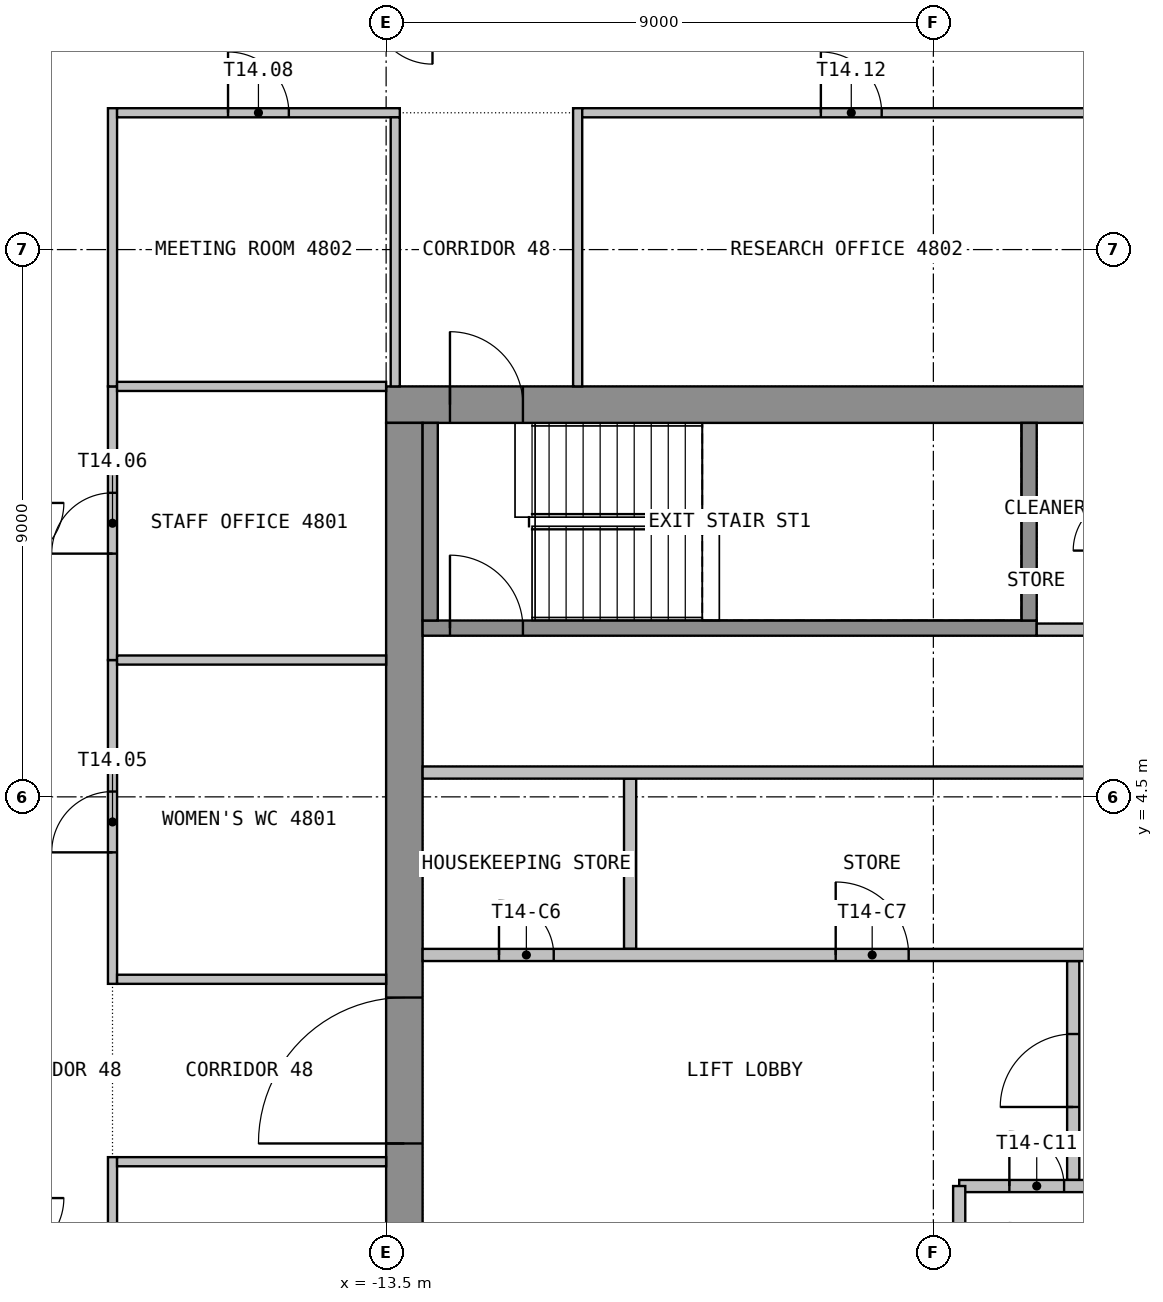
"""IFC4 building model, lengths in metres.
Left out: names, types, materials, properties, quantities, classifications, styles, units other than length and angle.
Written with IfcOpenShell. Run it as: python <this file> out.ifc"""

import sys

from ifc_helpers import new_model, si_unit, direction, frame, frame_2d, origin, place, context, subcontext, project, spatial, rectangle, extrude, element, fill, save


model = new_model("IFC4")
c1 = context("Model", 3, precision=1e-05, world=origin(), true_north=direction((0.0, 1.0)))
c2 = subcontext(c1, "Body", "Model", "MODEL_VIEW")
j1 = project(units=[si_unit("LENGTHUNIT", "METRE"), si_unit("PLANEANGLEUNIT", "RADIAN")], contexts=[c1])
p1 = place(None, origin())
s1 = spatial("IfcSite", under=j1, at=p1, CompositionType="ELEMENT")
p2 = place(p1, origin())
s2 = spatial("IfcBuilding", under=s1, at=p2, CompositionType="ELEMENT")
p3 = place(p2, frame((0.0, 0.0, 195.6)))
s3 = spatial("IfcBuildingStorey", under=s2, at=p3, CompositionType="ELEMENT", Elevation=195.6)
p4 = place(p3, frame((-13.5, 10.95, 0.0), z_axis=(0.0, 0.0, 1.0), x_axis=(1.0, 0.0, 0.0)))
e1 = element("IfcWall", 1, at=p4, inside=s3, PredefinedType="SHEAR", context=c2, shape_type="SweptSolid", body=[
    extrude(rectangle(XDim=27.0, YDim=0.6, at=frame_2d((13.5, 0.0))), origin(), (0.0, 0.0, 1.0), 3.55),
])
p5 = place(p4, frame((12.3, 0.0, 0.0)))
e2 = element("IfcOpeningElement", 2, at=p5, cuts=e1, PredefinedType="OPENING", context=c2, shape_type="SweptSolid", body=[
    extrude(rectangle(XDim=2.4, YDim=2.1, at=frame_2d((1.2, 1.05))), frame((0.0, 0.31, 0.0), z_axis=(0.0, -1.0, 0.0), x_axis=(1.0, 0.0, 0.0)), (0.0, 0.0, 1.0), 0.62),
])
p6 = place(p4, frame((1.05, 0.0, 0.0)))
e3 = element("IfcOpeningElement", 3, at=p6, cuts=e1, PredefinedType="OPENING", context=c2, shape_type="SweptSolid", body=[
    extrude(rectangle(XDim=1.2, YDim=2.1, at=frame_2d((0.6, 1.05))), frame((0.0, 0.31, 0.0), z_axis=(0.0, -1.0, 0.0), x_axis=(1.0, 0.0, 0.0)), (0.0, 0.0, 1.0), 0.62),
])
p7 = place(p4, frame((24.75, 0.0, 0.0)))
e4 = element("IfcOpeningElement", 4, at=p7, cuts=e1, PredefinedType="OPENING", context=c2, shape_type="SweptSolid", body=[
    extrude(rectangle(XDim=1.2, YDim=2.1, at=frame_2d((0.6, 1.05))), frame((0.0, 0.31, 0.0), z_axis=(0.0, -1.0, 0.0), x_axis=(1.0, 0.0, 0.0)), (0.0, 0.0, 1.0), 0.62),
])
p8 = place(p3, frame((-13.2, -10.65, 0.0), z_axis=(0.0, 0.0, 1.0), x_axis=(0.0, 1.0, 0.0)))
e5 = element("IfcWall", 5, at=p8, inside=s3, PredefinedType="SHEAR", context=c2, shape_type="SweptSolid", body=[
    extrude(rectangle(XDim=21.3, YDim=0.6, at=frame_2d((10.65, 0.0))), origin(), (0.0, 0.0, 1.0), 3.55),
])
p9 = place(p8, frame((9.45, 0.0, 0.0)))
e6 = element("IfcOpeningElement", 6, at=p9, cuts=e5, PredefinedType="OPENING", context=c2, shape_type="SweptSolid", body=[
    extrude(rectangle(XDim=2.4, YDim=2.1, at=frame_2d((1.2, 1.05))), frame((0.0, 0.31, 0.0), z_axis=(0.0, -1.0, 0.0), x_axis=(1.0, 0.0, 0.0)), (0.0, 0.0, 1.0), 0.62),
])
p10 = place(p3, frame((-2.2, -1.8, 0.0), z_axis=(0.0, 0.0, 1.0), x_axis=(0.0, 1.0, 0.0)))
e7 = element("IfcWall", 7, at=p10, inside=s3, PredefinedType="PARTITIONING", context=c2, shape_type="SweptSolid", body=[
    extrude(rectangle(XDim=3.6, YDim=0.2, at=frame_2d((1.8, 0.0))), origin(), (0.0, 0.0, 1.0), 3.55),
])
p11 = place(p10, frame((1.2, 0.0, 0.0)))
e8 = element("IfcOpeningElement", 8, at=p11, cuts=e7, PredefinedType="OPENING", context=c2, shape_type="SweptSolid", body=[
    extrude(rectangle(XDim=1.2, YDim=2.1, at=frame_2d((0.6, 1.05))), frame((0.0, 0.11, 0.0), z_axis=(0.0, -1.0, 0.0), x_axis=(1.0, 0.0, 0.0)), (0.0, 0.0, 1.0), 0.22),
])
p12 = place(p3, frame((-12.9, 7.275, 0.0), z_axis=(0.0, 0.0, 1.0), x_axis=(1.0, 0.0, 0.0)))
e9 = element("IfcWall", 9, at=p12, inside=s3, PredefinedType="SHEAR", context=c2, shape_type="SweptSolid", body=[
    extrude(rectangle(XDim=10.1, YDim=0.25, at=frame_2d((5.05, 0.0))), origin(), (0.0, 0.0, 1.0), 3.55),
])
p13 = place(p12, frame((0.45, 0.0, 0.0)))
e10 = element("IfcOpeningElement", 10, at=p13, cuts=e9, PredefinedType="OPENING", context=c2, shape_type="SweptSolid", body=[
    extrude(rectangle(XDim=1.2, YDim=2.1, at=frame_2d((0.6, 1.05))), frame((0.0, 0.135, 0.0), z_axis=(0.0, -1.0, 0.0), x_axis=(1.0, 0.0, 0.0)), (0.0, 0.0, 1.0), 0.27),
])
for number, where, z_axis, x_axis in (
    (11, (-12.775, 7.4, 0.0), (0.0, 0.0, 1.0), (0.0, 1.0, 0.0)),
    (12, (-2.925, 7.4, 0.0), (0.0, 0.0, 1.0), (0.0, 1.0, 0.0)),
):
    element("IfcWall", number, at=place(p3, frame(where, z_axis=z_axis, x_axis=x_axis)), inside=s3, PredefinedType="SHEAR", context=c2, shape_type="SweptSolid", body=[
        extrude(rectangle(XDim=3.25, YDim=0.25, at=frame_2d((1.625, 0.0))), origin(), (0.0, 0.0, 1.0), 3.55),
    ])
p14 = place(p3, frame((-2.8, 7.25, 0.0), z_axis=(0.0, 0.0, 1.0), x_axis=(1.0, 0.0, 0.0)))
e13 = element("IfcWall", 13, at=p14, inside=s3, PredefinedType="PARTITIONING", context=c2, shape_type="SweptSolid", body=[
    extrude(rectangle(XDim=1.4, YDim=0.2, at=frame_2d((0.7, 0.0))), origin(), (0.0, 0.0, 1.0), 3.55),
])
p15 = place(p3, frame((-9.488, 2.0, 0.0), z_axis=(0.0, 0.0, 1.0), x_axis=(0.0, 1.0, 0.0)))
e14 = element("IfcWall", 14, at=p15, inside=s3, PredefinedType="PARTITIONING", context=c2, shape_type="SweptSolid", body=[
    extrude(rectangle(XDim=2.8, YDim=0.2, at=frame_2d((1.4, 0.0))), origin(), (0.0, 0.0, 1.0), 3.55),
])
p16 = place(p3, frame((-12.9, 1.9, 0.0), z_axis=(0.0, 0.0, 1.0), x_axis=(1.0, 0.0, 0.0)))
e15 = element("IfcWall", 15, at=p16, inside=s3, PredefinedType="PARTITIONING", context=c2, shape_type="SweptSolid", body=[
    extrude(rectangle(XDim=11.375, YDim=0.2, at=frame_2d((5.688, 0.0))), origin(), (0.0, 0.0, 1.0), 3.55),
])
p17 = place(p16, frame((1.256, 0.0, 0.0)))
e16 = element("IfcOpeningElement", 16, at=p17, cuts=e15, PredefinedType="OPENING", context=c2, shape_type="SweptSolid", body=[
    extrude(rectangle(XDim=0.9, YDim=2.1, at=frame_2d((0.45, 1.05))), frame((0.0, 0.11, 0.0), z_axis=(0.0, -1.0, 0.0), x_axis=(1.0, 0.0, 0.0)), (0.0, 0.0, 1.0), 0.22),
])
p18 = place(p16, frame((6.794, 0.0, 0.0)))
e17 = element("IfcOpeningElement", 17, at=p18, cuts=e15, PredefinedType="OPENING", context=c2, shape_type="SweptSolid", body=[
    extrude(rectangle(XDim=1.2, YDim=2.1, at=frame_2d((0.6, 1.05))), frame((0.0, 0.11, 0.0), z_axis=(0.0, -1.0, 0.0), x_axis=(1.0, 0.0, 0.0)), (0.0, 0.0, 1.0), 0.22),
])
p19 = place(p3, frame((-12.9, 4.9, 0.0), z_axis=(0.0, 0.0, 1.0), x_axis=(1.0, 0.0, 0.0)))
e18 = element("IfcWall", 18, at=p19, inside=s3, PredefinedType="PARTITIONING", context=c2, shape_type="SweptSolid", body=[
    extrude(rectangle(XDim=11.375, YDim=0.2, at=frame_2d((5.688, 0.0))), origin(), (0.0, 0.0, 1.0), 3.55),
])
p20 = place(p3, frame((-4.075, -1.9, 0.0), z_axis=(0.0, 0.0, 1.0), x_axis=(1.0, 0.0, 0.0)))
e19 = element("IfcWall", 19, at=p20, inside=s3, PredefinedType="PARTITIONING", context=c2, shape_type="SweptSolid", body=[
    extrude(rectangle(XDim=2.55, YDim=0.2, at=frame_2d((1.275, 0.0))), origin(), (0.0, 0.0, 1.0), 3.55),
])
p21 = place(p20, frame((0.825, 0.0, 0.0)))
e20 = element("IfcOpeningElement", 20, at=p21, cuts=e19, PredefinedType="OPENING", context=c2, shape_type="SweptSolid", body=[
    extrude(rectangle(XDim=0.9, YDim=2.1, at=frame_2d((0.45, 1.05))), frame((0.0, 0.11, 0.0), z_axis=(0.0, -1.0, 0.0), x_axis=(1.0, 0.0, 0.0)), (0.0, 0.0, 1.0), 0.22),
])
p22 = place(p3, frame((-4.075, -1.9, 0.0), z_axis=(0.0, 0.0, 1.0), x_axis=(0.0, -1.0, 0.0)))
e21 = element("IfcWall", 21, at=p22, inside=s3, PredefinedType="PARTITIONING", context=c2, shape_type="SweptSolid", body=[
    extrude(rectangle(XDim=1.15, YDim=0.2, at=frame_2d((0.575, 0.0))), origin(), (0.0, 0.0, 1.0), 3.55),
])
p23 = place(p3, frame((-18.0, -11.25, 0.0), z_axis=(0.0, 0.0, 1.0), x_axis=(0.0, 1.0, 0.0)))
e22 = element("IfcWall", 22, at=p23, inside=s3, PredefinedType="PARTITIONING", context=c2, shape_type="SweptSolid", body=[
    extrude(rectangle(XDim=9.825, YDim=0.15, at=frame_2d((4.913, 0.0))), origin(), (0.0, 0.0, 1.0), 3.55),
])
p24 = place(p23, frame((4.413, 0.0, 0.0)))
e23 = element("IfcOpeningElement", 23, at=p24, cuts=e22, PredefinedType="OPENING", context=c2, shape_type="SweptSolid", body=[
    extrude(rectangle(XDim=1.0, YDim=2.1, at=frame_2d((0.5, 1.05))), frame((0.0, 0.085, 0.0), z_axis=(0.0, -1.0, 0.0), x_axis=(1.0, 0.0, 0.0)), (0.0, 0.0, 1.0), 0.17),
])
p25 = place(p3, frame((-17.925, -1.5, 0.0), z_axis=(0.0, 0.0, 1.0), x_axis=(1.0, 0.0, 0.0)))
e24 = element("IfcWall", 24, at=p25, inside=s3, PredefinedType="PARTITIONING", context=c2, shape_type="SweptSolid", body=[
    extrude(rectangle(XDim=4.425, YDim=0.15, at=frame_2d((2.212, 0.0))), origin(), (0.0, 0.0, 1.0), 3.55),
])
p26 = place(p3, frame((-18.0, 1.425, 0.0), z_axis=(0.0, 0.0, 1.0), x_axis=(0.0, 1.0, 0.0)))
e25 = element("IfcWall", 25, at=p26, inside=s3, PredefinedType="PARTITIONING", context=c2, shape_type="SweptSolid", body=[
    extrude(rectangle(XDim=5.325, YDim=0.15, at=frame_2d((2.663, 0.0))), origin(), (0.0, 0.0, 1.0), 3.55),
])
p27 = place(p26, frame((2.163, 0.0, 0.0)))
e26 = element("IfcOpeningElement", 26, at=p27, cuts=e25, PredefinedType="OPENING", context=c2, shape_type="SweptSolid", body=[
    extrude(rectangle(XDim=1.0, YDim=2.1, at=frame_2d((0.5, 1.05))), frame((0.0, 0.085, 0.0), z_axis=(0.0, -1.0, 0.0), x_axis=(1.0, 0.0, 0.0)), (0.0, 0.0, 1.0), 0.17),
])
p28 = place(p3, frame((-13.5, 1.5, 0.0), z_axis=(0.0, 0.0, 1.0), x_axis=(-1.0, 0.0, 0.0)))
e27 = element("IfcWall", 27, at=p28, inside=s3, PredefinedType="PARTITIONING", context=c2, shape_type="SweptSolid", body=[
    extrude(rectangle(XDim=4.425, YDim=0.15, at=frame_2d((2.212, 0.0))), origin(), (0.0, 0.0, 1.0), 3.55),
])
p29 = place(p3, frame((-18.0, 6.75, 0.0), z_axis=(0.0, 0.0, 1.0), x_axis=(0.0, 1.0, 0.0)))
e28 = element("IfcWall", 28, at=p29, inside=s3, PredefinedType="PARTITIONING", context=c2, shape_type="SweptSolid", body=[
    extrude(rectangle(XDim=4.5, YDim=0.15, at=frame_2d((2.25, 0.0))), origin(), (0.0, 0.0, 1.0), 3.55),
])
p30 = place(p29, frame((1.75, 0.0, 0.0)))
e29 = element("IfcOpeningElement", 29, at=p30, cuts=e28, PredefinedType="OPENING", context=c2, shape_type="SweptSolid", body=[
    extrude(rectangle(XDim=1.0, YDim=2.1, at=frame_2d((0.5, 1.05))), frame((0.0, 0.085, 0.0), z_axis=(0.0, -1.0, 0.0), x_axis=(1.0, 0.0, 0.0)), (0.0, 0.0, 1.0), 0.17),
])
p31 = place(p3, frame((-17.925, 6.75, 0.0), z_axis=(0.0, 0.0, 1.0), x_axis=(1.0, 0.0, 0.0)))
e30 = element("IfcWall", 30, at=p31, inside=s3, PredefinedType="PARTITIONING", context=c2, shape_type="SweptSolid", body=[
    extrude(rectangle(XDim=4.425, YDim=0.15, at=frame_2d((2.212, 0.0))), origin(), (0.0, 0.0, 1.0), 3.55),
])
p32 = place(p3, frame((-18.0, 11.25, 0.0), z_axis=(0.0, 0.0, 1.0), x_axis=(0.0, 1.0, 0.0)))
e31 = element("IfcWall", 31, at=p32, inside=s3, PredefinedType="PARTITIONING", context=c2, shape_type="SweptSolid", body=[
    extrude(rectangle(XDim=4.575, YDim=0.15, at=frame_2d((2.288, 0.0))), origin(), (0.0, 0.0, 1.0), 3.55),
])
p33 = place(p3, frame((-17.925, 11.25, 0.0), z_axis=(0.0, 0.0, 1.0), x_axis=(1.0, 0.0, 0.0)))
e32 = element("IfcWall", 32, at=p33, inside=s3, PredefinedType="PARTITIONING", context=c2, shape_type="SweptSolid", body=[
    extrude(rectangle(XDim=4.425, YDim=0.15, at=frame_2d((2.212, 0.0))), origin(), (0.0, 0.0, 1.0), 3.55),
])
p34 = place(p3, frame((-17.925, 15.75, 0.0), z_axis=(0.0, 0.0, 1.0), x_axis=(1.0, 0.0, 0.0)))
e33 = element("IfcWall", 33, at=p34, inside=s3, PredefinedType="PARTITIONING", context=c2, shape_type="SweptSolid", body=[
    extrude(rectangle(XDim=4.65, YDim=0.15, at=frame_2d((2.325, 0.0))), origin(), (0.0, 0.0, 1.0), 3.55),
])
p35 = place(p34, frame((1.825, 0.0, 0.0)))
e34 = element("IfcOpeningElement", 34, at=p35, cuts=e33, PredefinedType="OPENING", context=c2, shape_type="SweptSolid", body=[
    extrude(rectangle(XDim=1.0, YDim=2.1, at=frame_2d((0.5, 1.05))), frame((0.0, 0.085, 0.0), z_axis=(0.0, -1.0, 0.0), x_axis=(1.0, 0.0, 0.0)), (0.0, 0.0, 1.0), 0.17),
])
p36 = place(p3, frame((-13.35, 15.675, 0.0), z_axis=(0.0, 0.0, 1.0), x_axis=(0.0, -1.0, 0.0)))
e35 = element("IfcWall", 35, at=p36, inside=s3, PredefinedType="PARTITIONING", context=c2, shape_type="SweptSolid", body=[
    extrude(rectangle(XDim=4.425, YDim=0.15, at=frame_2d((2.212, 0.0))), origin(), (0.0, 0.0, 1.0), 3.55),
])
p37 = place(p3, frame((-10.35, 11.25, 0.0), z_axis=(0.0, 0.0, 1.0), x_axis=(0.0, 1.0, 0.0)))
e36 = element("IfcWall", 36, at=p37, inside=s3, PredefinedType="PARTITIONING", context=c2, shape_type="SweptSolid", body=[
    extrude(rectangle(XDim=4.575, YDim=0.15, at=frame_2d((2.288, 0.0))), origin(), (0.0, 0.0, 1.0), 3.55),
])
p38 = place(p3, frame((-10.275, 15.75, 0.0), z_axis=(0.0, 0.0, 1.0), x_axis=(1.0, 0.0, 0.0)))
e37 = element("IfcWall", 37, at=p38, inside=s3, PredefinedType="PARTITIONING", context=c2, shape_type="SweptSolid", body=[
    extrude(rectangle(XDim=8.85, YDim=0.15, at=frame_2d((4.425, 0.0))), origin(), (0.0, 0.0, 1.0), 3.55),
])
p39 = place(p38, frame((3.925, 0.0, 0.0)))
e38 = element("IfcOpeningElement", 38, at=p39, cuts=e37, PredefinedType="OPENING", context=c2, shape_type="SweptSolid", body=[
    extrude(rectangle(XDim=1.0, YDim=2.1, at=frame_2d((0.5, 1.05))), frame((0.0, 0.085, 0.0), z_axis=(0.0, -1.0, 0.0), x_axis=(1.0, 0.0, 0.0)), (0.0, 0.0, 1.0), 0.17),
])
p40 = place(p9, origin())
e39 = element("IfcDoor", 39, at=p40, inside=s3, OperationType="DOUBLE_DOOR_DOUBLE_SWING", PredefinedType="DOOR", context=c2, shape_type="SweptSolid", body=[
    extrude(rectangle(XDim=2.4, YDim=2.1, at=frame_2d((1.2, 1.05))), frame((0.0, 0.025, 0.0), z_axis=(0.0, -1.0, 0.0), x_axis=(1.0, 0.0, 0.0)), (0.0, 0.0, 1.0), 0.05),
])
fill(e6, e39)
p41 = place(p6, origin())
e40 = element("IfcDoor", 40, at=p41, inside=s3, OperationType="SINGLE_SWING_RIGHT", PredefinedType="DOOR", context=c2, shape_type="SweptSolid", body=[
    extrude(rectangle(XDim=1.2, YDim=2.1, at=frame_2d((0.6, 1.05))), frame((0.0, 0.025, 0.0), z_axis=(0.0, -1.0, 0.0), x_axis=(1.0, 0.0, 0.0)), (0.0, 0.0, 1.0), 0.05),
])
fill(e3, e40)
p42 = place(p11, origin())
e41 = element("IfcDoor", 41, at=p42, inside=s3, OperationType="SINGLE_SWING_LEFT", PredefinedType="DOOR", context=c2, shape_type="SweptSolid", body=[
    extrude(rectangle(XDim=1.2, YDim=2.1, at=frame_2d((0.6, 1.05))), frame((0.0, 0.025, 0.0), z_axis=(0.0, -1.0, 0.0), x_axis=(1.0, 0.0, 0.0)), (0.0, 0.0, 1.0), 0.05),
])
fill(e8, e41)
p43 = place(p13, origin())
e42 = element("IfcDoor", 42, at=p43, inside=s3, OperationType="SINGLE_SWING_LEFT", PredefinedType="DOOR", context=c2, shape_type="SweptSolid", body=[
    extrude(rectangle(XDim=1.2, YDim=2.1, at=frame_2d((0.6, 1.05))), frame((0.0, 0.025, 0.0), z_axis=(0.0, -1.0, 0.0), x_axis=(1.0, 0.0, 0.0)), (0.0, 0.0, 1.0), 0.05),
])
fill(e10, e42)
p44 = place(p17, origin())
e43 = element("IfcDoor", 43, at=p44, inside=s3, OperationType="SINGLE_SWING_LEFT", PredefinedType="DOOR", context=c2, shape_type="SweptSolid", body=[
    extrude(rectangle(XDim=0.9, YDim=2.1, at=frame_2d((0.45, 1.05))), frame((0.0, 0.025, 0.0), z_axis=(0.0, -1.0, 0.0), x_axis=(1.0, 0.0, 0.0)), (0.0, 0.0, 1.0), 0.05),
])
fill(e16, e43)
p45 = place(p18, origin())
e44 = element("IfcDoor", 44, at=p45, inside=s3, OperationType="SINGLE_SWING_RIGHT", PredefinedType="DOOR", context=c2, shape_type="SweptSolid", body=[
    extrude(rectangle(XDim=1.2, YDim=2.1, at=frame_2d((0.6, 1.05))), frame((0.0, 0.025, 0.0), z_axis=(0.0, -1.0, 0.0), x_axis=(1.0, 0.0, 0.0)), (0.0, 0.0, 1.0), 0.05),
])
fill(e17, e44)
p46 = place(p21, origin())
e45 = element("IfcDoor", 45, at=p46, inside=s3, OperationType="SINGLE_SWING_LEFT", PredefinedType="DOOR", context=c2, shape_type="SweptSolid", body=[
    extrude(rectangle(XDim=0.9, YDim=2.1, at=frame_2d((0.45, 1.05))), frame((0.0, 0.025, 0.0), z_axis=(0.0, -1.0, 0.0), x_axis=(1.0, 0.0, 0.0)), (0.0, 0.0, 1.0), 0.05),
])
fill(e20, e45)
p47 = place(p27, origin())
e46 = element("IfcDoor", 46, at=p47, inside=s3, OperationType="SINGLE_SWING_LEFT", PredefinedType="DOOR", context=c2, shape_type="SweptSolid", body=[
    extrude(rectangle(XDim=1.0, YDim=2.1, at=frame_2d((0.5, 1.05))), frame((0.0, 0.025, 0.0), z_axis=(0.0, -1.0, 0.0), x_axis=(1.0, 0.0, 0.0)), (0.0, 0.0, 1.0), 0.05),
])
fill(e26, e46)
p48 = place(p30, origin())
e47 = element("IfcDoor", 47, at=p48, inside=s3, OperationType="SINGLE_SWING_RIGHT", PredefinedType="DOOR", context=c2, shape_type="SweptSolid", body=[
    extrude(rectangle(XDim=1.0, YDim=2.1, at=frame_2d((0.5, 1.05))), frame((0.0, 0.025, 0.0), z_axis=(0.0, -1.0, 0.0), x_axis=(1.0, 0.0, 0.0)), (0.0, 0.0, 1.0), 0.05),
])
fill(e29, e47)
p49 = place(p35, origin())
e48 = element("IfcDoor", 48, at=p49, inside=s3, OperationType="SINGLE_SWING_LEFT", PredefinedType="DOOR", context=c2, shape_type="SweptSolid", body=[
    extrude(rectangle(XDim=1.0, YDim=2.1, at=frame_2d((0.5, 1.05))), frame((0.0, 0.025, 0.0), z_axis=(0.0, -1.0, 0.0), x_axis=(1.0, 0.0, 0.0)), (0.0, 0.0, 1.0), 0.05),
])
fill(e34, e48)
p50 = place(p39, origin())
e49 = element("IfcDoor", 49, at=p50, inside=s3, OperationType="SINGLE_SWING_RIGHT", PredefinedType="DOOR", context=c2, shape_type="SweptSolid", body=[
    extrude(rectangle(XDim=1.0, YDim=2.1, at=frame_2d((0.5, 1.05))), frame((0.0, 0.025, 0.0), z_axis=(0.0, -1.0, 0.0), x_axis=(1.0, 0.0, 0.0)), (0.0, 0.0, 1.0), 0.05),
])
fill(e38, e49)
save(model, sys.argv[1])
